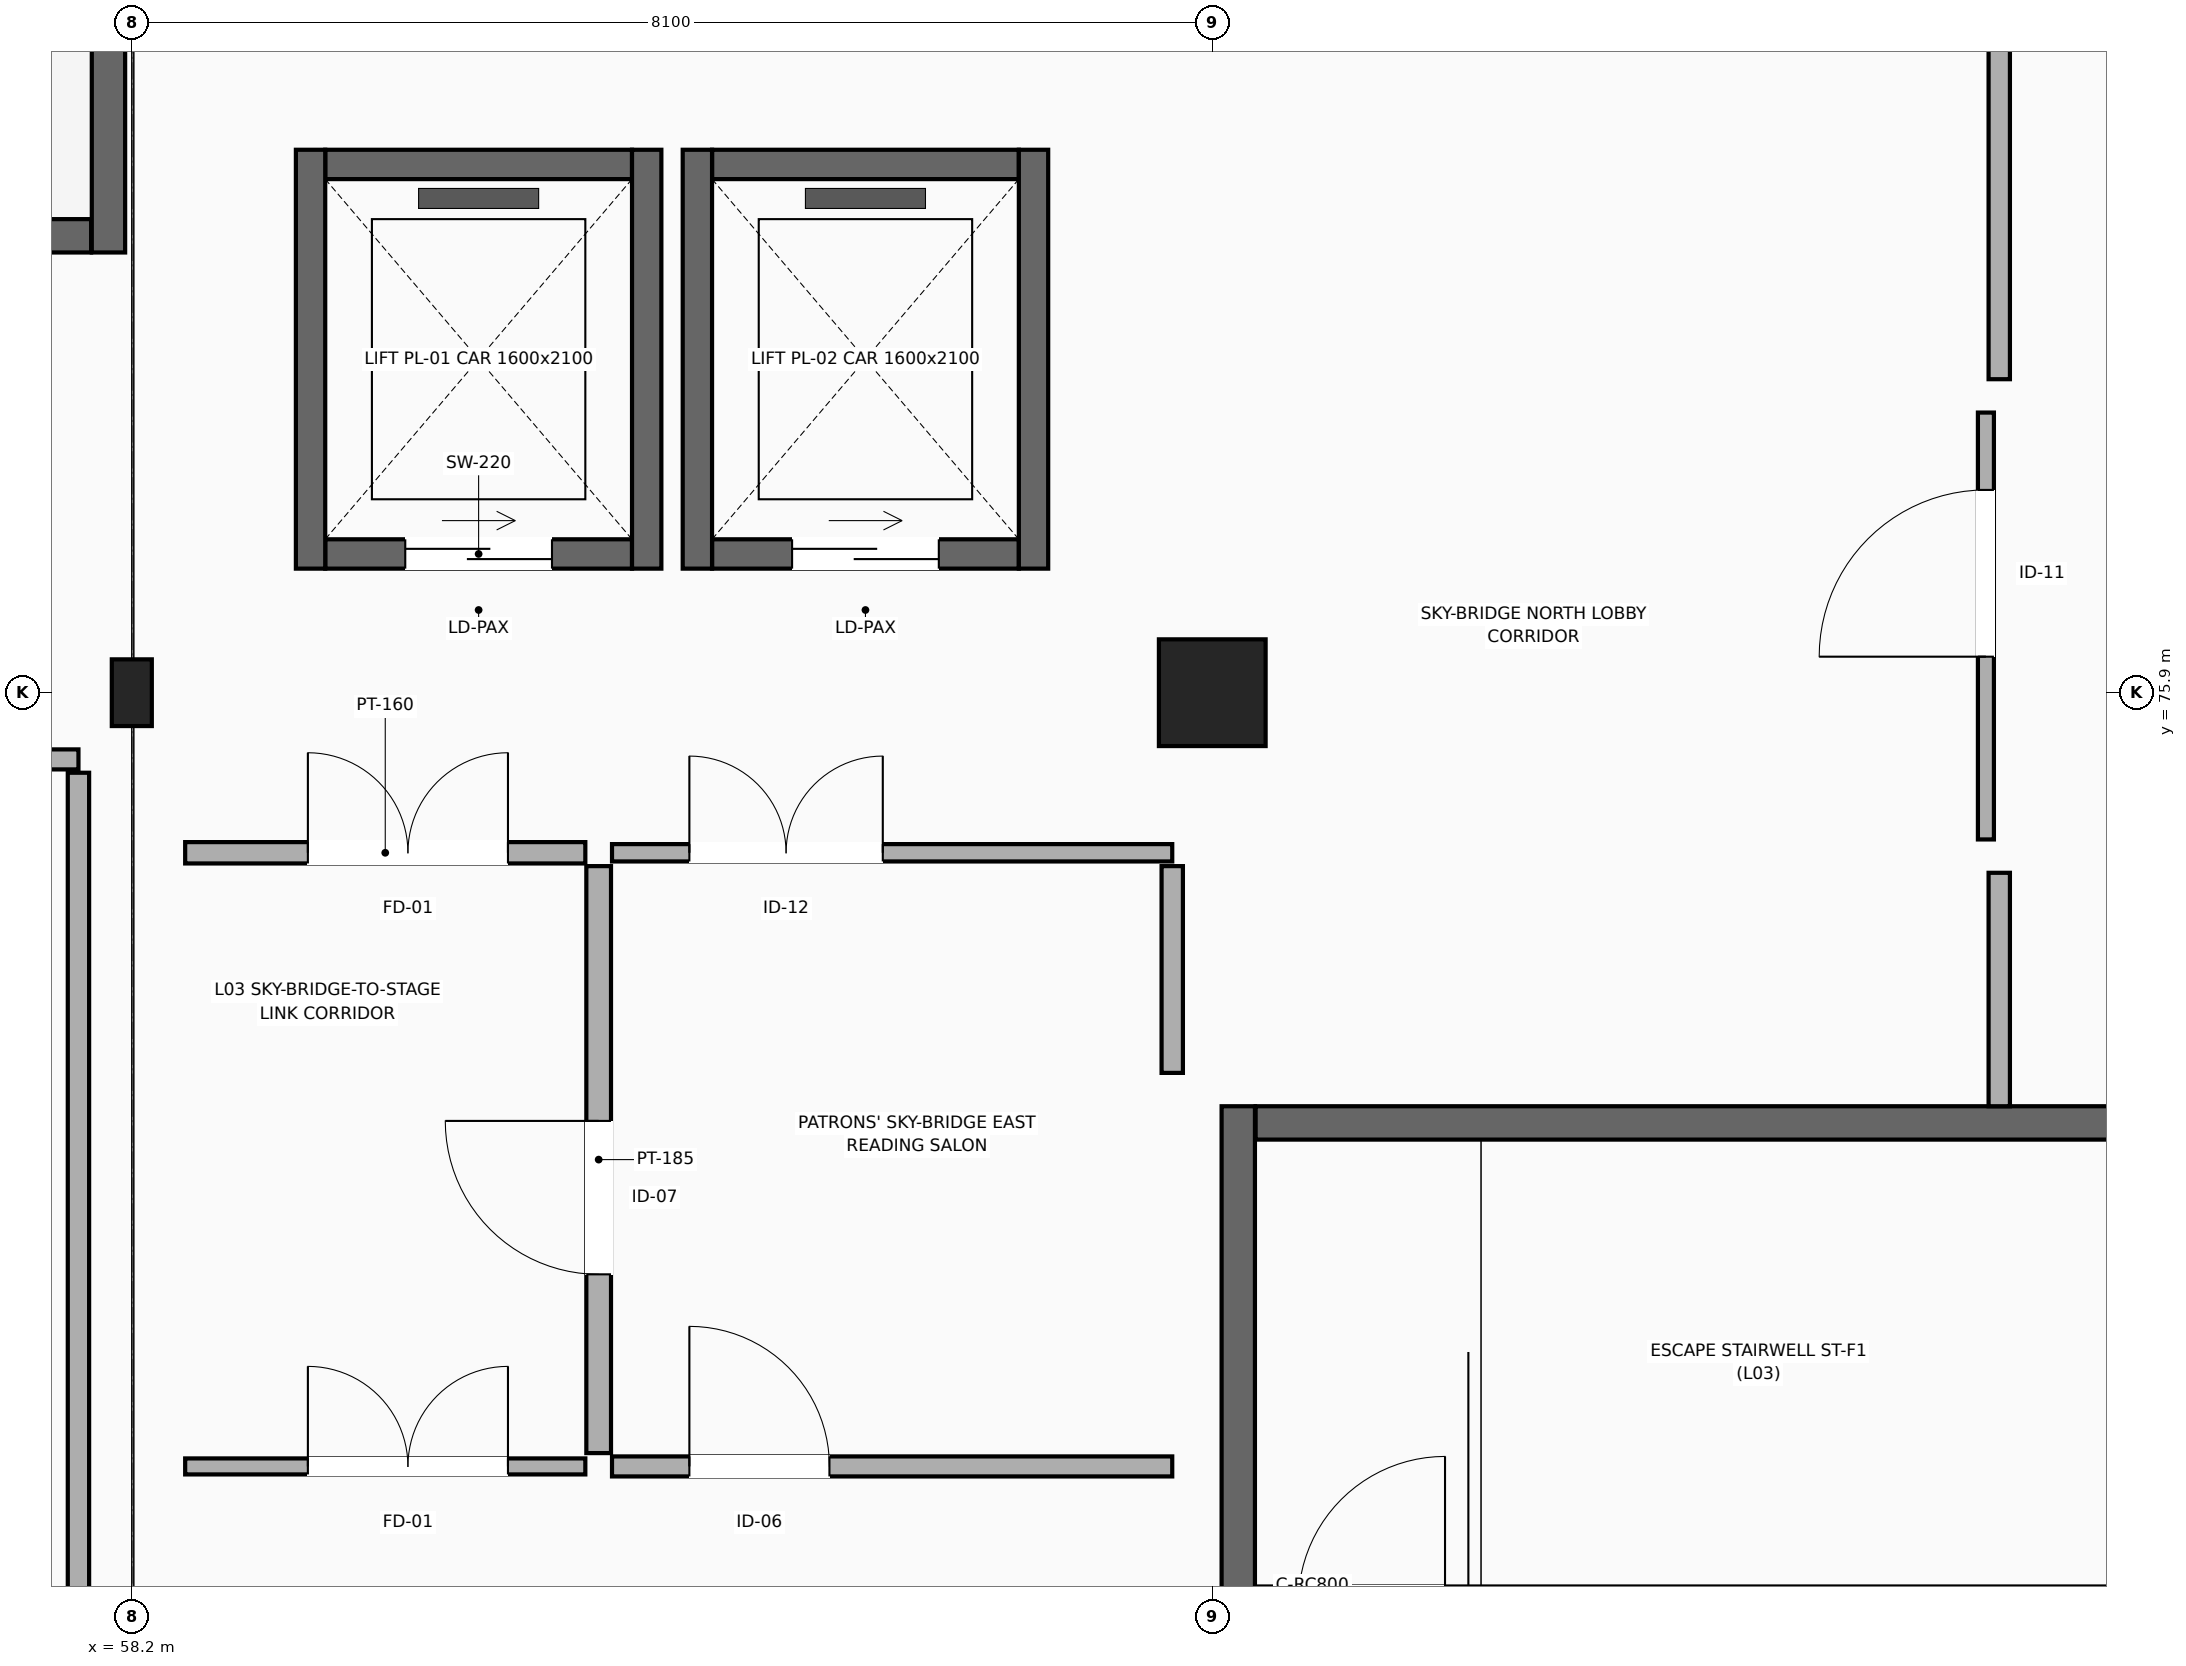
"""IFC4 building model, lengths in metres.
Left out: names, types, materials, properties, quantities, classifications, styles, units other than length and angle.
Written with IfcOpenShell. Run it as: python <this file> out.ifc"""

import sys

from ifc_helpers import new_model, si_unit, direction, frame, frame_2d, origin, origin_2d, place, context, subcontext, project, spatial, rectangle, i_section, extrude, element, fill, save


model = new_model("IFC4")
c1 = context("Model", 3, precision=1e-05, world=origin(), true_north=direction((0.0, 1.0)))
c2 = subcontext(c1, "Body", "Model", "MODEL_VIEW")
j1 = project(units=[si_unit("LENGTHUNIT", "METRE"), si_unit("PLANEANGLEUNIT", "RADIAN")], contexts=[c1])
p1 = place(None, origin())
s1 = spatial("IfcSite", under=j1, at=p1, CompositionType="ELEMENT")
p2 = place(p1, origin())
s2 = spatial("IfcBuilding", under=s1, at=p2, CompositionType="ELEMENT")
p3 = place(p2, frame((0.0, 0.0, 14.7)))
s3 = spatial("IfcBuildingStorey", under=s2, at=p3, CompositionType="ELEMENT", Elevation=14.7)
p4 = place(p3, frame((58.2, 75.9, 0.0), z_axis=(0.0, 0.0, 1.0), x_axis=(1.0, 0.0, 0.0)))
e1 = element("IfcColumn", 1, at=p4, inside=s3, PredefinedType="COLUMN", context=c2, shape_type="SweptSolid", body=[
    extrude(i_section(OverallWidth=0.3, OverallDepth=0.5, WebThickness=0.014, FlangeThickness=0.028, FilletRadius=0.027, at=origin_2d()), origin(), (0.0, 0.0, 1.0), 4.5),
])
p5 = place(p3, frame((66.3, 75.9, 0.0), z_axis=(0.0, 0.0, 1.0), x_axis=(1.0, 0.0, 0.0)))
e2 = element("IfcColumn", 2, at=p5, inside=s3, PredefinedType="COLUMN", context=c2, shape_type="SweptSolid", body=[
    extrude(rectangle(XDim=0.8, YDim=0.8, at=origin_2d()), origin(), (0.0, 0.0, 1.0), 4.5),
])
p6 = place(p3, frame((50.255, 79.325, 0.0), z_axis=(0.0, 0.0, 1.0), x_axis=(1.0, 0.0, 0.0)))
e3 = element("IfcWall", 3, at=p6, inside=s3, PredefinedType="SHEAR", context=c2, shape_type="SweptSolid", body=[
    extrude(rectangle(XDim=7.64, YDim=0.25, at=frame_2d((3.82, 0.0))), origin(), (0.0, 0.0, 1.0), 4.245),
])
p7 = place(p6, frame((0.32, 0.0, 0.0)))
e4 = element("IfcOpeningElement", 4, at=p7, cuts=e3, PredefinedType="OPENING", context=c2, shape_type="SweptSolid", body=[
    extrude(rectangle(XDim=1.1, YDim=2.2, at=frame_2d((0.55, 1.1))), frame((0.0, 0.135, 0.0), z_axis=(0.0, -1.0, 0.0), x_axis=(1.0, 0.0, 0.0)), (0.0, 0.0, 1.0), 0.27),
])
p8 = place(p3, frame((58.025, 79.2, 0.0), z_axis=(0.0, 0.0, 1.0), x_axis=(0.0, 1.0, 0.0)))
e5 = element("IfcWall", 5, at=p8, inside=s3, PredefinedType="SHEAR", context=c2, shape_type="SweptSolid", body=[
    extrude(rectangle(XDim=3.75, YDim=0.25, at=frame_2d((1.875, 0.0))), origin(), (0.0, 0.0, 1.0), 4.245),
])
p9 = place(p3, frame((66.625, 72.675, 0.0), z_axis=(0.0, 0.0, 1.0), x_axis=(1.0, 0.0, 0.0)))
e6 = element("IfcWall", 6, at=p9, inside=s3, PredefinedType="SHEAR", context=c2, shape_type="SweptSolid", body=[
    extrude(rectangle(XDim=7.54, YDim=0.25, at=frame_2d((3.77, 0.0))), origin(), (0.0, 0.0, 1.0), 4.245),
])
p10 = place(p3, frame((66.495, 68.95, 0.0), z_axis=(0.0, 0.0, 1.0), x_axis=(0.0, 1.0, 0.0)))
e7 = element("IfcWall", 7, at=p10, inside=s3, PredefinedType="SHEAR", context=c2, shape_type="SweptSolid", body=[
    extrude(rectangle(XDim=3.85, YDim=0.25, at=frame_2d((1.925, 0.0))), origin(), (0.0, 0.0, 1.0), 4.245),
])
p11 = place(p3, frame((59.65, 76.94, 0.0), z_axis=(0.0, 0.0, 1.0), x_axis=(1.0, 0.0, 0.0)))
e8 = element("IfcWall", 8, at=p11, inside=s3, PredefinedType="SOLIDWALL", context=c2, shape_type="SweptSolid", body=[
    extrude(rectangle(XDim=2.3, YDim=0.22, at=frame_2d((1.15, 0.0))), origin(), (0.0, 0.0, 1.0), 4.245),
])
p12 = place(p11, frame((0.6, 0.0, 0.0)))
e9 = element("IfcOpeningElement", 9, at=p12, cuts=e8, PredefinedType="OPENING", context=c2, shape_type="SweptSolid", body=[
    extrude(rectangle(XDim=1.1, YDim=2.2, at=frame_2d((0.55, 1.1))), frame((0.0, 0.12, 0.0), z_axis=(0.0, -1.0, 0.0), x_axis=(1.0, 0.0, 0.0)), (0.0, 0.0, 1.0), 0.24),
])
p13 = place(p3, frame((59.65, 79.86, 0.0), z_axis=(0.0, 0.0, 1.0), x_axis=(1.0, 0.0, 0.0)))
e10 = element("IfcWall", 10, at=p13, inside=s3, PredefinedType="SOLIDWALL", context=c2, shape_type="SweptSolid", body=[
    extrude(rectangle(XDim=2.3, YDim=0.22, at=frame_2d((1.15, 0.0))), origin(), (0.0, 0.0, 1.0), 4.245),
])
for number, where, z_axis, x_axis in (
    (11, (59.54, 76.83, 0.0), (0.0, 0.0, 1.0), (0.0, 1.0, 0.0)),
    (12, (62.06, 76.83, 0.0), (0.0, 0.0, 1.0), (0.0, 1.0, 0.0)),
):
    element("IfcWall", number, at=place(p3, frame(where, z_axis=z_axis, x_axis=x_axis)), inside=s3, PredefinedType="SOLIDWALL", context=c2, shape_type="SweptSolid", body=[
        extrude(rectangle(XDim=3.14, YDim=0.22, at=frame_2d((1.57, 0.0))), origin(), (0.0, 0.0, 1.0), 4.245),
    ])
p14 = place(p3, frame((62.55, 76.94, 0.0), z_axis=(0.0, 0.0, 1.0), x_axis=(1.0, 0.0, 0.0)))
e13 = element("IfcWall", 13, at=p14, inside=s3, PredefinedType="SOLIDWALL", context=c2, shape_type="SweptSolid", body=[
    extrude(rectangle(XDim=2.3, YDim=0.22, at=frame_2d((1.15, 0.0))), origin(), (0.0, 0.0, 1.0), 4.245),
])
p15 = place(p14, frame((0.6, 0.0, 0.0)))
e14 = element("IfcOpeningElement", 14, at=p15, cuts=e13, PredefinedType="OPENING", context=c2, shape_type="SweptSolid", body=[
    extrude(rectangle(XDim=1.1, YDim=2.2, at=frame_2d((0.55, 1.1))), frame((0.0, 0.12, 0.0), z_axis=(0.0, -1.0, 0.0), x_axis=(1.0, 0.0, 0.0)), (0.0, 0.0, 1.0), 0.24),
])
p16 = place(p3, frame((62.55, 79.86, 0.0), z_axis=(0.0, 0.0, 1.0), x_axis=(1.0, 0.0, 0.0)))
e15 = element("IfcWall", 15, at=p16, inside=s3, PredefinedType="SOLIDWALL", context=c2, shape_type="SweptSolid", body=[
    extrude(rectangle(XDim=2.3, YDim=0.22, at=frame_2d((1.15, 0.0))), origin(), (0.0, 0.0, 1.0), 4.245),
])
for number, where, z_axis, x_axis in (
    (16, (62.44, 76.83, 0.0), (0.0, 0.0, 1.0), (0.0, 1.0, 0.0)),
    (17, (64.96, 76.83, 0.0), (0.0, 0.0, 1.0), (0.0, 1.0, 0.0)),
):
    element("IfcWall", number, at=place(p3, frame(where, z_axis=z_axis, x_axis=x_axis)), inside=s3, PredefinedType="SOLIDWALL", context=c2, shape_type="SweptSolid", body=[
        extrude(rectangle(XDim=3.14, YDim=0.22, at=frame_2d((1.57, 0.0))), origin(), (0.0, 0.0, 1.0), 4.245),
    ])
p17 = place(p3, frame((54.5, 75.4, 0.0), z_axis=(0.0, 0.0, 1.0), x_axis=(1.0, 0.0, 0.0)))
e18 = element("IfcWall", 18, at=p17, inside=s3, PredefinedType="MOVABLE", context=c2, shape_type="SweptSolid", body=[
    extrude(rectangle(XDim=3.3, YDim=0.15, at=frame_2d((1.65, 0.0))), origin(), (0.0, 0.0, 1.0), 4.225),
])
p18 = place(p17, frame((0.58, 0.0, 0.0)))
e19 = element("IfcOpeningElement", 19, at=p18, cuts=e18, PredefinedType="OPENING", context=c2, shape_type="SweptSolid", body=[
    extrude(rectangle(XDim=1.45, YDim=2.3, at=frame_2d((0.725, 1.15))), frame((0.0, 0.085, 0.0), z_axis=(0.0, -1.0, 0.0), x_axis=(1.0, 0.0, 0.0)), (0.0, 0.0, 1.0), 0.17),
])
p19 = place(p3, frame((58.6, 70.1, 0.0), z_axis=(0.0, 0.0, 1.0), x_axis=(1.0, 0.0, 0.0)))
e20 = element("IfcWall", 20, at=p19, inside=s3, PredefinedType="PARTITIONING", context=c2, shape_type="SweptSolid", body=[
    extrude(rectangle(XDim=3.0, YDim=0.12, at=frame_2d((1.5, 0.0))), origin(), (0.0, 0.0, 1.0), 3.827),
])
p20 = place(p19, frame((0.92, 0.0, 0.0)))
e21 = element("IfcOpeningElement", 21, at=p20, cuts=e20, PredefinedType="OPENING", context=c2, shape_type="SweptSolid", body=[
    extrude(rectangle(XDim=1.5, YDim=2.2, at=frame_2d((0.75, 1.1))), frame((0.0, 0.07, 0.0), z_axis=(0.0, -1.0, 0.0), x_axis=(1.0, 0.0, 0.0)), (0.0, 0.0, 1.0), 0.14),
])
p21 = place(p3, frame((61.8, 70.1, 0.0), z_axis=(0.0, 0.0, 1.0), x_axis=(1.0, 0.0, 0.0)))
e22 = element("IfcWall", 22, at=p21, inside=s3, PredefinedType="MOVABLE", context=c2, shape_type="SweptSolid", body=[
    extrude(rectangle(XDim=4.2, YDim=0.15, at=frame_2d((2.1, 0.0))), origin(), (0.0, 0.0, 1.0), 3.777),
])
p22 = place(p21, frame((0.58, 0.0, 0.0)))
e23 = element("IfcOpeningElement", 23, at=p22, cuts=e22, PredefinedType="OPENING", context=c2, shape_type="SweptSolid", body=[
    extrude(rectangle(XDim=1.05, YDim=2.25, at=frame_2d((0.525, 1.125))), frame((0.0, 0.085, 0.0), z_axis=(0.0, -1.0, 0.0), x_axis=(1.0, 0.0, 0.0)), (0.0, 0.0, 1.0), 0.17),
])
p23 = place(p3, frame((58.6, 74.7, 0.0), z_axis=(0.0, 0.0, 1.0), x_axis=(1.0, 0.0, 0.0)))
e24 = element("IfcWall", 24, at=p23, inside=s3, PredefinedType="PARTITIONING", context=c2, shape_type="SweptSolid", body=[
    extrude(rectangle(XDim=3.0, YDim=0.16, at=frame_2d((1.5, 0.0))), origin(), (0.0, 0.0, 1.0), 3.827),
])
p24 = place(p23, frame((0.92, 0.0, 0.0)))
e25 = element("IfcOpeningElement", 25, at=p24, cuts=e24, PredefinedType="OPENING", context=c2, shape_type="SweptSolid", body=[
    extrude(rectangle(XDim=1.5, YDim=2.2, at=frame_2d((0.75, 1.1))), frame((0.0, 0.09, 0.0), z_axis=(0.0, -1.0, 0.0), x_axis=(1.0, 0.0, 0.0)), (0.0, 0.0, 1.0), 0.18),
])
p25 = place(p3, frame((61.7, 70.2, 0.0), z_axis=(0.0, 0.0, 1.0), x_axis=(0.0, 1.0, 0.0)))
e26 = element("IfcWall", 26, at=p25, inside=s3, PredefinedType="PARTITIONING", context=c2, shape_type="SweptSolid", body=[
    extrude(rectangle(XDim=4.4, YDim=0.185, at=frame_2d((2.2, 0.0))), origin(), (0.0, 0.0, 1.0), 4.225),
])
p26 = place(p25, frame((1.34, 0.0, 0.0)))
e27 = element("IfcOpeningElement", 27, at=p26, cuts=e26, PredefinedType="OPENING", context=c2, shape_type="SweptSolid", body=[
    extrude(rectangle(XDim=1.15, YDim=2.25, at=frame_2d((0.575, 1.125))), frame((0.0, 0.103, 0.0), z_axis=(0.0, -1.0, 0.0), x_axis=(1.0, 0.0, 0.0)), (0.0, 0.0, 1.0), 0.205),
])
p27 = place(p3, frame((72.1, 74.8, 0.0), z_axis=(0.0, 0.0, 1.0), x_axis=(0.0, 1.0, 0.0)))
e28 = element("IfcWall", 28, at=p27, inside=s3, PredefinedType="PARTITIONING", context=c2, shape_type="SweptSolid", body=[
    extrude(rectangle(XDim=3.2, YDim=0.12, at=frame_2d((1.6, 0.0))), origin(), (0.0, 0.0, 1.0), 3.027),
])
p28 = place(p27, frame((1.37, 0.0, 0.0)))
e29 = element("IfcOpeningElement", 29, at=p28, cuts=e28, PredefinedType="OPENING", context=c2, shape_type="SweptSolid", body=[
    extrude(rectangle(XDim=1.25, YDim=2.15, at=frame_2d((0.625, 1.075))), frame((0.0, 0.07, 0.0), z_axis=(0.0, -1.0, 0.0), x_axis=(1.0, 0.0, 0.0)), (0.0, 0.0, 1.0), 0.14),
])
p29 = place(p3, frame((61.8, 74.7, 0.0), z_axis=(0.0, 0.0, 1.0), x_axis=(1.0, 0.0, 0.0)))
e30 = element("IfcWall", 30, at=p29, inside=s3, PredefinedType="PARTITIONING", context=c2, shape_type="SweptSolid", body=[
    extrude(rectangle(XDim=4.2, YDim=0.13, at=frame_2d((2.1, 0.0))), origin(), (0.0, 0.0, 1.0), 3.777),
])
p30 = place(p29, frame((0.58, 0.0, 0.0)))
e31 = element("IfcOpeningElement", 31, at=p30, cuts=e30, PredefinedType="OPENING", context=c2, shape_type="SweptSolid", body=[
    extrude(rectangle(XDim=1.45, YDim=2.3, at=frame_2d((0.725, 1.15))), frame((0.0, 0.075, 0.0), z_axis=(0.0, -1.0, 0.0), x_axis=(1.0, 0.0, 0.0)), (0.0, 0.0, 1.0), 0.15),
])
p31 = place(p3, frame((57.8, 61.4, 0.0), z_axis=(0.0, 0.0, 1.0), x_axis=(0.0, 1.0, 0.0)))
e32 = element("IfcWall", 32, at=p31, inside=s3, PredefinedType="PARTITIONING", context=c2, shape_type="SweptSolid", body=[
    extrude(rectangle(XDim=13.9, YDim=0.16, at=frame_2d((6.95, 0.0))), origin(), (0.0, 0.0, 1.0), 4.225),
])
p32 = place(p3, frame((72.2, 72.8, 0.0), z_axis=(0.0, 0.0, 1.0), x_axis=(0.0, 1.0, 0.0)))
e33 = element("IfcWall", 33, at=p32, inside=s3, PredefinedType="PARTITIONING", context=c2, shape_type="SweptSolid", body=[
    extrude(rectangle(XDim=1.75, YDim=0.16, at=frame_2d((0.875, 0.0))), origin(), (0.0, 0.0, 1.0), 4.225),
])
p33 = place(p3, frame((72.2, 78.25, 0.0), z_axis=(0.0, 0.0, 1.0), x_axis=(0.0, 1.0, 0.0)))
e34 = element("IfcWall", 34, at=p33, inside=s3, PredefinedType="PARTITIONING", context=c2, shape_type="SweptSolid", body=[
    extrude(rectangle(XDim=4.55, YDim=0.16, at=frame_2d((2.275, 0.0))), origin(), (0.0, 0.0, 1.0), 4.225),
])
p34 = place(p3, frame((66.0, 73.05, 0.0), z_axis=(0.0, 0.0, 1.0), x_axis=(0.0, 1.0, 0.0)))
e35 = element("IfcWall", 35, at=p34, inside=s3, PredefinedType="PARTITIONING", context=c2, shape_type="SweptSolid", body=[
    extrude(rectangle(XDim=1.55, YDim=0.16, at=frame_2d((0.775, 0.0))), origin(), (0.0, 0.0, 1.0), 4.225),
])
p35 = place(p12, origin())
e36 = element("IfcDoor", 36, at=p35, inside=s3, OperationType="SLIDING_TO_LEFT", PredefinedType="DOOR", context=c2, shape_type="SweptSolid", body=[
    extrude(rectangle(XDim=1.1, YDim=2.2, at=frame_2d((0.55, 1.1))), frame((0.0, 0.025, 0.0), z_axis=(0.0, -1.0, 0.0), x_axis=(1.0, 0.0, 0.0)), (0.0, 0.0, 1.0), 0.05),
])
fill(e9, e36)
p36 = place(p15, origin())
e37 = element("IfcDoor", 37, at=p36, inside=s3, OperationType="SLIDING_TO_LEFT", PredefinedType="DOOR", context=c2, shape_type="SweptSolid", body=[
    extrude(rectangle(XDim=1.1, YDim=2.2, at=frame_2d((0.55, 1.1))), frame((0.0, 0.025, 0.0), z_axis=(0.0, -1.0, 0.0), x_axis=(1.0, 0.0, 0.0)), (0.0, 0.0, 1.0), 0.05),
])
fill(e14, e37)
p37 = place(p20, origin())
e38 = element("IfcDoor", 38, at=p37, inside=s3, OperationType="DOUBLE_DOOR_SINGLE_SWING", PredefinedType="DOOR", context=c2, shape_type="SweptSolid", body=[
    extrude(rectangle(XDim=1.5, YDim=2.2, at=frame_2d((0.75, 1.1))), frame((0.0, 0.025, 0.0), z_axis=(0.0, -1.0, 0.0), x_axis=(1.0, 0.0, 0.0)), (0.0, 0.0, 1.0), 0.05),
])
fill(e21, e38)
p38 = place(p22, origin())
e39 = element("IfcDoor", 39, at=p38, inside=s3, OperationType="SINGLE_SWING_LEFT", PredefinedType="DOOR", context=c2, shape_type="SweptSolid", body=[
    extrude(rectangle(XDim=1.05, YDim=2.25, at=frame_2d((0.525, 1.125))), frame((0.0, 0.025, 0.0), z_axis=(0.0, -1.0, 0.0), x_axis=(1.0, 0.0, 0.0)), (0.0, 0.0, 1.0), 0.05),
])
fill(e23, e39)
p39 = place(p24, origin())
e40 = element("IfcDoor", 40, at=p39, inside=s3, OperationType="DOUBLE_DOOR_SINGLE_SWING", PredefinedType="DOOR", context=c2, shape_type="SweptSolid", body=[
    extrude(rectangle(XDim=1.5, YDim=2.2, at=frame_2d((0.75, 1.1))), frame((0.0, 0.025, 0.0), z_axis=(0.0, -1.0, 0.0), x_axis=(1.0, 0.0, 0.0)), (0.0, 0.0, 1.0), 0.05),
])
fill(e25, e40)
p40 = place(p26, origin())
e41 = element("IfcDoor", 41, at=p40, inside=s3, OperationType="SINGLE_SWING_RIGHT", PredefinedType="DOOR", context=c2, shape_type="SweptSolid", body=[
    extrude(rectangle(XDim=1.15, YDim=2.25, at=frame_2d((0.575, 1.125))), frame((0.0, 0.025, 0.0), z_axis=(0.0, -1.0, 0.0), x_axis=(1.0, 0.0, 0.0)), (0.0, 0.0, 1.0), 0.05),
])
fill(e27, e41)
p41 = place(p28, origin())
e42 = element("IfcDoor", 42, at=p41, inside=s3, OperationType="SINGLE_SWING_LEFT", PredefinedType="DOOR", context=c2, shape_type="SweptSolid", body=[
    extrude(rectangle(XDim=1.25, YDim=2.15, at=frame_2d((0.625, 1.075))), frame((0.0, 0.025, 0.0), z_axis=(0.0, -1.0, 0.0), x_axis=(1.0, 0.0, 0.0)), (0.0, 0.0, 1.0), 0.05),
])
fill(e29, e42)
p42 = place(p30, origin())
e43 = element("IfcDoor", 43, at=p42, inside=s3, OperationType="DOUBLE_DOOR_SINGLE_SWING", PredefinedType="DOOR", context=c2, shape_type="SweptSolid", body=[
    extrude(rectangle(XDim=1.45, YDim=2.3, at=frame_2d((0.725, 1.15))), frame((0.0, 0.025, 0.0), z_axis=(0.0, -1.0, 0.0), x_axis=(1.0, 0.0, 0.0)), (0.0, 0.0, 1.0), 0.05),
])
fill(e31, e43)
save(model, sys.argv[1])
